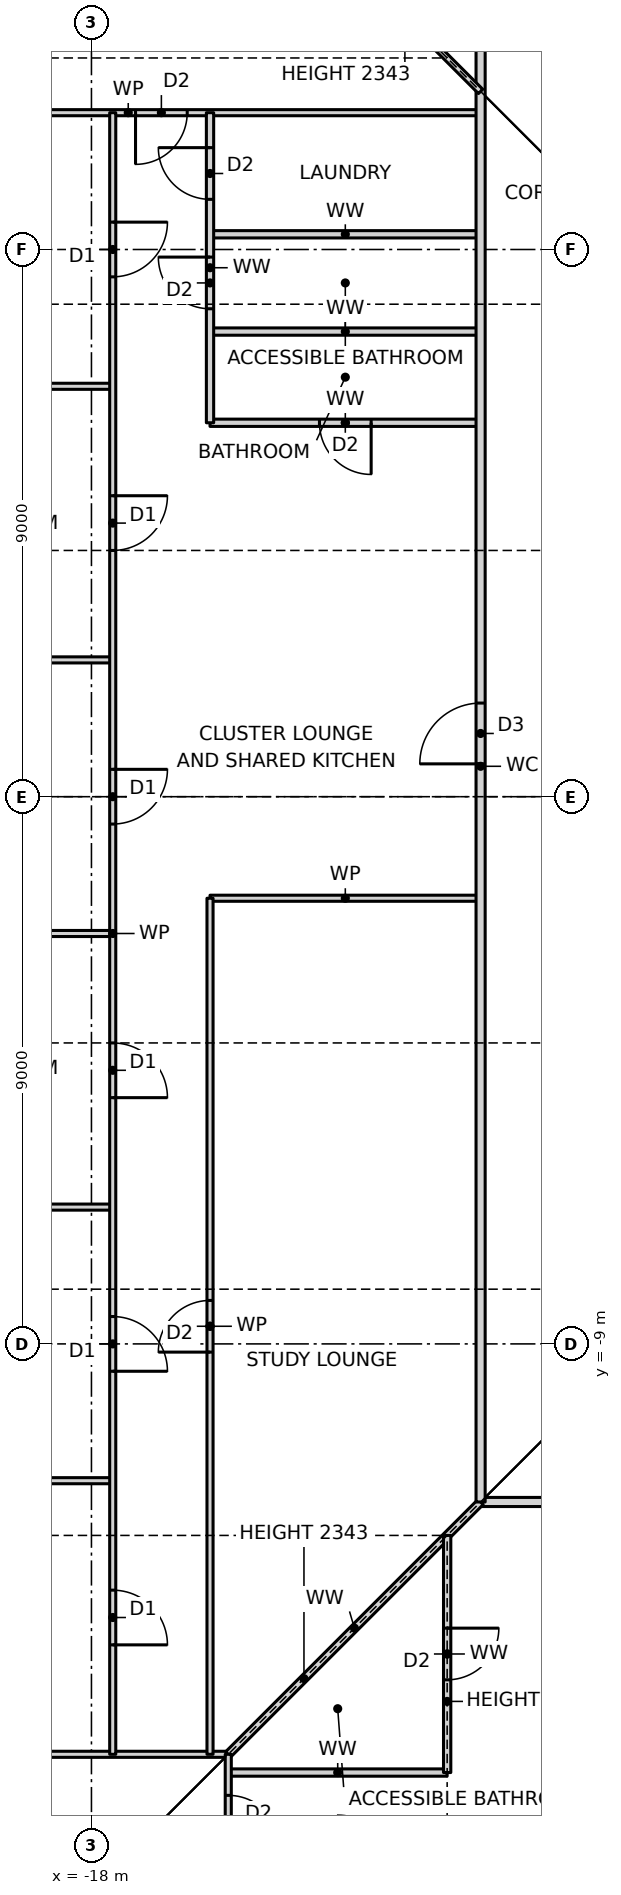
"""IFC4 building model, lengths in metres.
Left out: names, types, materials, properties, quantities, classifications, styles, units other than length and angle.
Written with IfcOpenShell. Run it as: python <this file> out.ifc"""

import sys

from ifc_helpers import new_model, si_unit, direction, frame, frame_2d, origin, place, context, subcontext, project, spatial, rectangle, extrude, element, fill, save


model = new_model("IFC4")
c1 = context("Model", 3, precision=1e-05, world=origin(), true_north=direction((0.0, 1.0)))
c2 = subcontext(c1, "Body", "Model", "MODEL_VIEW")
j1 = project(units=[si_unit("LENGTHUNIT", "METRE"), si_unit("PLANEANGLEUNIT", "RADIAN")], contexts=[c1])
p1 = place(None, origin())
s1 = spatial("IfcSite", under=j1, at=p1, CompositionType="ELEMENT")
p2 = place(p1, origin())
s2 = spatial("IfcBuilding", under=s1, at=p2, CompositionType="ELEMENT")
p3 = place(p2, frame((0.0, 0.0, 39.5)))
s3 = spatial("IfcBuildingStorey", under=s2, at=p3, CompositionType="ELEMENT", Elevation=39.5)
p4 = place(p3, frame((-15.75, -16.05, 0.0), z_axis=(0.0, 0.0, 1.0), x_axis=(1.0, 0.0, 0.0)))
e1 = element("IfcWall", 1, at=p4, inside=s3, PredefinedType="PARTITIONING", context=c2, shape_type="SweptSolid", body=[
    extrude(rectangle(XDim=3.6, YDim=0.12, at=frame_2d((1.8, 0.0))), origin(), (0.0, 0.0, 1.0), 3.27),
])
p5 = place(p3, frame((-23.19, -15.75, 0.0), z_axis=(0.0, 0.0, 1.0), x_axis=(1.0, 0.0, 0.0)))
e2 = element("IfcWall", 2, at=p5, inside=s3, PredefinedType="PARTITIONING", context=c2, shape_type="SweptSolid", body=[
    extrude(rectangle(XDim=7.44, YDim=0.1, at=frame_2d((3.72, 0.0))), origin(), (0.0, 0.0, 1.0), 3.27),
])
p6 = place(p3, frame((-11.6, -11.6, 0.0), z_axis=(0.0, 0.0, 1.0), x_axis=(1.0, 0.0, 0.0)))
e3 = element("IfcWall", 3, at=p6, inside=s3, PredefinedType="PARTITIONING", context=c2, shape_type="SweptSolid", body=[
    extrude(rectangle(XDim=23.2, YDim=0.15, at=frame_2d((11.6, 0.0))), origin(), (0.0, 0.0, 1.0), 3.27),
])
p7 = place(p6, frame((2.975, 0.0, 0.0)))
e4 = element("IfcOpeningElement", 4, at=p7, cuts=e3, PredefinedType="OPENING", context=c2, shape_type="SweptSolid", body=[
    extrude(rectangle(XDim=1.0, YDim=2.1, at=frame_2d((0.5, 1.05))), frame((0.0, 0.085, 0.0), z_axis=(0.0, -1.0, 0.0), x_axis=(1.0, 0.0, 0.0)), (0.0, 0.0, 1.0), 0.17),
])
p8 = place(p6, frame((18.6, 0.0, 0.0)))
e5 = element("IfcOpeningElement", 5, at=p8, cuts=e3, PredefinedType="OPENING", context=c2, shape_type="SweptSolid", body=[
    extrude(rectangle(XDim=1.0, YDim=2.1, at=frame_2d((0.5, 1.05))), frame((0.0, 0.085, 0.0), z_axis=(0.0, -1.0, 0.0), x_axis=(1.0, 0.0, 0.0)), (0.0, 0.0, 1.0), 0.17),
])
for number, where, z_axis, x_axis in (
    (6, (-23.19, -11.25, 0.0), (0.0, 0.0, 1.0), (1.0, 0.0, 0.0)),
    (7, (-23.19, -6.75, 0.0), (0.0, 0.0, 1.0), (1.0, 0.0, 0.0)),
    (8, (-23.19, -2.25, 0.0), (0.0, 0.0, 1.0), (1.0, 0.0, 0.0)),
):
    element("IfcWall", number, at=place(p3, frame(where, z_axis=z_axis, x_axis=x_axis)), inside=s3, PredefinedType="PARTITIONING", context=c2, shape_type="SweptSolid", body=[
        extrude(rectangle(XDim=5.54, YDim=0.1, at=frame_2d((2.77, 0.0))), origin(), (0.0, 0.0, 1.0), 3.27),
    ])
p9 = place(p3, frame((-16.05, -1.67, 0.0), z_axis=(0.0, 0.0, 1.0), x_axis=(1.0, 0.0, 0.0)))
e9 = element("IfcWall", 9, at=p9, inside=s3, PredefinedType="PARTITIONING", context=c2, shape_type="SweptSolid", body=[
    extrude(rectangle(XDim=4.45, YDim=0.1, at=frame_2d((2.225, 0.0))), origin(), (0.0, 0.0, 1.0), 3.27),
])
p10 = place(p3, frame((-23.19, 2.25, 0.0), z_axis=(0.0, 0.0, 1.0), x_axis=(1.0, 0.0, 0.0)))
e10 = element("IfcWall", 10, at=p10, inside=s3, PredefinedType="PARTITIONING", context=c2, shape_type="SweptSolid", body=[
    extrude(rectangle(XDim=5.54, YDim=0.1, at=frame_2d((2.77, 0.0))), origin(), (0.0, 0.0, 1.0), 3.27),
])
p11 = place(p3, frame((-16.05, 6.15, 0.0), z_axis=(0.0, 0.0, 1.0), x_axis=(1.0, 0.0, 0.0)))
e11 = element("IfcWall", 11, at=p11, inside=s3, PredefinedType="PARTITIONING", context=c2, shape_type="SweptSolid", body=[
    extrude(rectangle(XDim=4.45, YDim=0.12, at=frame_2d((2.225, 0.0))), origin(), (0.0, 0.0, 1.0), 3.27),
])
p12 = place(p11, frame((1.8, 0.0, 0.0)))
e12 = element("IfcOpeningElement", 12, at=p12, cuts=e11, PredefinedType="OPENING", context=c2, shape_type="SweptSolid", body=[
    extrude(rectangle(XDim=0.85, YDim=2.1, at=frame_2d((0.425, 1.05))), frame((0.0, 0.07, 0.0), z_axis=(0.0, -1.0, 0.0), x_axis=(1.0, 0.0, 0.0)), (0.0, 0.0, 1.0), 0.14),
])
p13 = place(p3, frame((-23.19, 6.75, 0.0), z_axis=(0.0, 0.0, 1.0), x_axis=(1.0, 0.0, 0.0)))
e13 = element("IfcWall", 13, at=p13, inside=s3, PredefinedType="PARTITIONING", context=c2, shape_type="SweptSolid", body=[
    extrude(rectangle(XDim=5.54, YDim=0.1, at=frame_2d((2.77, 0.0))), origin(), (0.0, 0.0, 1.0), 3.27),
])
for number, where, z_axis, x_axis in (
    (14, (-16.05, 7.65, 0.0), (0.0, 0.0, 1.0), (1.0, 0.0, 0.0)),
    (15, (-16.05, 9.25, 0.0), (0.0, 0.0, 1.0), (1.0, 0.0, 0.0)),
):
    element("IfcWall", number, at=place(p3, frame(where, z_axis=z_axis, x_axis=x_axis)), inside=s3, PredefinedType="PARTITIONING", context=c2, shape_type="SweptSolid", body=[
        extrude(rectangle(XDim=4.45, YDim=0.12, at=frame_2d((2.225, 0.0))), origin(), (0.0, 0.0, 1.0), 3.27),
    ])
p14 = place(p3, frame((-23.19, 11.25, 0.0), z_axis=(0.0, 0.0, 1.0), x_axis=(1.0, 0.0, 0.0)))
e16 = element("IfcWall", 16, at=p14, inside=s3, PredefinedType="PARTITIONING", context=c2, shape_type="SweptSolid", body=[
    extrude(rectangle(XDim=11.59, YDim=0.1, at=frame_2d((5.795, 0.0))), origin(), (0.0, 0.0, 1.0), 3.27),
])
p15 = place(p14, frame((5.915, 0.0, 0.0)))
e17 = element("IfcOpeningElement", 17, at=p15, cuts=e16, PredefinedType="OPENING", context=c2, shape_type="SweptSolid", body=[
    extrude(rectangle(XDim=0.85, YDim=2.1, at=frame_2d((0.425, 1.05))), frame((0.0, 0.06, 0.0), z_axis=(0.0, -1.0, 0.0), x_axis=(1.0, 0.0, 0.0)), (0.0, 0.0, 1.0), 0.12),
])
p16 = place(p3, frame((-15.75, -15.75, 0.0), z_axis=(0.0, 0.0, 1.0), x_axis=(0.707106781187, 0.707106781187, 0.0)))
e18 = element("IfcWall", 18, at=p16, inside=s3, PredefinedType="PARTITIONING", context=c2, shape_type="SweptSolid", body=[
    extrude(rectangle(XDim=5.869, YDim=0.12, at=frame_2d((2.935, 0.0))), origin(), (0.0, 0.0, 1.0), 2.343),
])
p17 = place(p3, frame((-11.6, -11.6, 0.0), z_axis=(0.0, 0.0, 1.0), x_axis=(0.0, 1.0, 0.0)))
e19 = element("IfcWall", 19, at=p17, inside=s3, PredefinedType="PARTITIONING", context=c2, shape_type="SweptSolid", body=[
    extrude(rectangle(XDim=24.2, YDim=0.15, at=frame_2d((12.1, 0.0))), origin(), (0.0, 0.0, 1.0), 3.27),
])
p18 = place(p17, frame((12.14, 0.0, 0.0)))
e20 = element("IfcOpeningElement", 20, at=p18, cuts=e19, PredefinedType="OPENING", context=c2, shape_type="SweptSolid", body=[
    extrude(rectangle(XDim=1.0, YDim=2.1, at=frame_2d((0.5, 1.05))), frame((0.0, 0.085, 0.0), z_axis=(0.0, -1.0, 0.0), x_axis=(1.0, 0.0, 0.0)), (0.0, 0.0, 1.0), 0.17),
])
p19 = place(p3, frame((-12.15, -16.05, 0.0), z_axis=(0.0, 0.0, 1.0), x_axis=(0.0, 1.0, 0.0)))
e21 = element("IfcWall", 21, at=p19, inside=s3, PredefinedType="PARTITIONING", context=c2, shape_type="SweptSolid", body=[
    extrude(rectangle(XDim=3.9, YDim=0.12, at=frame_2d((1.95, 0.0))), origin(), (0.0, 0.0, 1.0), 2.508),
])
p20 = place(p19, frame((1.525, 0.0, 0.0)))
e22 = element("IfcOpeningElement", 22, at=p20, cuts=e21, PredefinedType="OPENING", context=c2, shape_type="SweptSolid", body=[
    extrude(rectangle(XDim=0.85, YDim=2.1, at=frame_2d((0.425, 1.05))), frame((0.0, 0.07, 0.0), z_axis=(0.0, -1.0, 0.0), x_axis=(1.0, 0.0, 0.0)), (0.0, 0.0, 1.0), 0.14),
])
p21 = place(p3, frame((-15.75, -23.19, 0.0), z_axis=(0.0, 0.0, 1.0), x_axis=(0.0, 1.0, 0.0)))
e23 = element("IfcWall", 23, at=p21, inside=s3, PredefinedType="PARTITIONING", context=c2, shape_type="SweptSolid", body=[
    extrude(rectangle(XDim=7.44, YDim=0.1, at=frame_2d((3.72, 0.0))), origin(), (0.0, 0.0, 1.0), 3.27),
])
p22 = place(p21, frame((5.915, 0.0, 0.0)))
e24 = element("IfcOpeningElement", 24, at=p22, cuts=e23, PredefinedType="OPENING", context=c2, shape_type="SweptSolid", body=[
    extrude(rectangle(XDim=0.85, YDim=2.1, at=frame_2d((0.425, 1.05))), frame((0.0, 0.06, 0.0), z_axis=(0.0, -1.0, 0.0), x_axis=(1.0, 0.0, 0.0)), (0.0, 0.0, 1.0), 0.12),
])
p23 = place(p3, frame((-16.05, -15.75, 0.0), z_axis=(0.0, 0.0, 1.0), x_axis=(0.0, 1.0, 0.0)))
e25 = element("IfcWall", 25, at=p23, inside=s3, PredefinedType="PARTITIONING", context=c2, shape_type="SweptSolid", body=[
    extrude(rectangle(XDim=14.08, YDim=0.1, at=frame_2d((7.04, 0.0))), origin(), (0.0, 0.0, 1.0), 3.27),
])
p24 = place(p23, frame((6.615, 0.0, 0.0)))
e26 = element("IfcOpeningElement", 26, at=p24, cuts=e25, PredefinedType="OPENING", context=c2, shape_type="SweptSolid", body=[
    extrude(rectangle(XDim=0.85, YDim=2.1, at=frame_2d((0.425, 1.05))), frame((0.0, 0.06, 0.0), z_axis=(0.0, -1.0, 0.0), x_axis=(1.0, 0.0, 0.0)), (0.0, 0.0, 1.0), 0.12),
])
p25 = place(p3, frame((-16.05, 6.15, 0.0), z_axis=(0.0, 0.0, 1.0), x_axis=(0.0, 1.0, 0.0)))
e27 = element("IfcWall", 27, at=p25, inside=s3, PredefinedType="PARTITIONING", context=c2, shape_type="SweptSolid", body=[
    extrude(rectangle(XDim=5.1, YDim=0.12, at=frame_2d((2.55, 0.0))), origin(), (0.0, 0.0, 1.0), 3.27),
])
p26 = place(p25, frame((3.675, 0.0, 0.0)))
e28 = element("IfcOpeningElement", 28, at=p26, cuts=e27, PredefinedType="OPENING", context=c2, shape_type="SweptSolid", body=[
    extrude(rectangle(XDim=0.85, YDim=2.1, at=frame_2d((0.425, 1.05))), frame((0.0, 0.07, 0.0), z_axis=(0.0, -1.0, 0.0), x_axis=(1.0, 0.0, 0.0)), (0.0, 0.0, 1.0), 0.14),
])
p27 = place(p25, frame((1.875, 0.0, 0.0)))
e29 = element("IfcOpeningElement", 29, at=p27, cuts=e27, PredefinedType="OPENING", context=c2, shape_type="SweptSolid", body=[
    extrude(rectangle(XDim=0.85, YDim=2.1, at=frame_2d((0.425, 1.05))), frame((0.0, 0.07, 0.0), z_axis=(0.0, -1.0, 0.0), x_axis=(1.0, 0.0, 0.0)), (0.0, 0.0, 1.0), 0.14),
])
p28 = place(p3, frame((-17.65, -15.75, 0.0), z_axis=(0.0, 0.0, 1.0), x_axis=(0.0, 1.0, 0.0)))
e30 = element("IfcWall", 30, at=p28, inside=s3, PredefinedType="PARTITIONING", context=c2, shape_type="SweptSolid", body=[
    extrude(rectangle(XDim=27.0, YDim=0.1, at=frame_2d((13.5, 0.0))), origin(), (0.0, 0.0, 1.0), 3.27),
])
p29 = place(p28, frame((24.3, 0.0, 0.0)))
e31 = element("IfcOpeningElement", 31, at=p29, cuts=e30, PredefinedType="OPENING", context=c2, shape_type="SweptSolid", body=[
    extrude(rectangle(XDim=0.9, YDim=2.1, at=frame_2d((0.45, 1.05))), frame((0.0, 0.06, 0.0), z_axis=(0.0, -1.0, 0.0), x_axis=(1.0, 0.0, 0.0)), (0.0, 0.0, 1.0), 0.12),
])
p30 = place(p28, frame((19.8, 0.0, 0.0)))
e32 = element("IfcOpeningElement", 32, at=p30, cuts=e30, PredefinedType="OPENING", context=c2, shape_type="SweptSolid", body=[
    extrude(rectangle(XDim=0.9, YDim=2.1, at=frame_2d((0.45, 1.05))), frame((0.0, 0.06, 0.0), z_axis=(0.0, -1.0, 0.0), x_axis=(1.0, 0.0, 0.0)), (0.0, 0.0, 1.0), 0.12),
])
p31 = place(p28, frame((15.3, 0.0, 0.0)))
e33 = element("IfcOpeningElement", 33, at=p31, cuts=e30, PredefinedType="OPENING", context=c2, shape_type="SweptSolid", body=[
    extrude(rectangle(XDim=0.9, YDim=2.1, at=frame_2d((0.45, 1.05))), frame((0.0, 0.06, 0.0), z_axis=(0.0, -1.0, 0.0), x_axis=(1.0, 0.0, 0.0)), (0.0, 0.0, 1.0), 0.12),
])
p32 = place(p28, frame((10.8, 0.0, 0.0)))
e34 = element("IfcOpeningElement", 34, at=p32, cuts=e30, PredefinedType="OPENING", context=c2, shape_type="SweptSolid", body=[
    extrude(rectangle(XDim=0.9, YDim=2.1, at=frame_2d((0.45, 1.05))), frame((0.0, 0.06, 0.0), z_axis=(0.0, -1.0, 0.0), x_axis=(1.0, 0.0, 0.0)), (0.0, 0.0, 1.0), 0.12),
])
p33 = place(p28, frame((6.3, 0.0, 0.0)))
e35 = element("IfcOpeningElement", 35, at=p33, cuts=e30, PredefinedType="OPENING", context=c2, shape_type="SweptSolid", body=[
    extrude(rectangle(XDim=0.9, YDim=2.1, at=frame_2d((0.45, 1.05))), frame((0.0, 0.06, 0.0), z_axis=(0.0, -1.0, 0.0), x_axis=(1.0, 0.0, 0.0)), (0.0, 0.0, 1.0), 0.12),
])
p34 = place(p28, frame((1.8, 0.0, 0.0)))
e36 = element("IfcOpeningElement", 36, at=p34, cuts=e30, PredefinedType="OPENING", context=c2, shape_type="SweptSolid", body=[
    extrude(rectangle(XDim=0.9, YDim=2.1, at=frame_2d((0.45, 1.05))), frame((0.0, 0.06, 0.0), z_axis=(0.0, -1.0, 0.0), x_axis=(1.0, 0.0, 0.0)), (0.0, 0.0, 1.0), 0.12),
])
p35 = place(p3, frame((-11.6, 11.6, 0.0), z_axis=(0.0, 0.0, 1.0), x_axis=(-0.707106781187, 0.707106781187, 0.0)))
e37 = element("IfcWall", 37, at=p35, inside=s3, PredefinedType="PARTITIONING", context=c2, shape_type="SweptSolid", body=[
    extrude(rectangle(XDim=5.869, YDim=0.1, at=frame_2d((2.935, 0.0))), origin(), (0.0, 0.0, 1.0), 2.343),
])
p36 = place(p20, frame((0.85, 0.0, 0.0), z_axis=(0.0, 0.0, 1.0), x_axis=(-1.0, 0.0, 0.0)))
e38 = element("IfcDoor", 38, at=p36, inside=s3, OperationType="SINGLE_SWING_LEFT", PredefinedType="DOOR", context=c2, shape_type="SweptSolid", body=[
    extrude(rectangle(XDim=0.85, YDim=2.1, at=frame_2d((0.425, 1.05))), frame((0.0, 0.025, 0.0), z_axis=(0.0, -1.0, 0.0), x_axis=(1.0, 0.0, 0.0)), (0.0, 0.0, 1.0), 0.05),
])
fill(e22, e38)
p37 = place(p15, frame((0.85, 0.0, 0.0), z_axis=(0.0, 0.0, 1.0), x_axis=(-1.0, 0.0, 0.0)))
e39 = element("IfcDoor", 39, at=p37, inside=s3, OperationType="SINGLE_SWING_RIGHT", PredefinedType="DOOR", context=c2, shape_type="SweptSolid", body=[
    extrude(rectangle(XDim=0.85, YDim=2.1, at=frame_2d((0.425, 1.05))), frame((0.0, 0.025, 0.0), z_axis=(0.0, -1.0, 0.0), x_axis=(1.0, 0.0, 0.0)), (0.0, 0.0, 1.0), 0.05),
])
fill(e17, e39)
p38 = place(p29, frame((0.9, 0.0, 0.0), z_axis=(0.0, 0.0, 1.0), x_axis=(-1.0, 0.0, 0.0)))
e40 = element("IfcDoor", 40, at=p38, inside=s3, OperationType="SINGLE_SWING_LEFT", PredefinedType="DOOR", context=c2, shape_type="SweptSolid", body=[
    extrude(rectangle(XDim=0.9, YDim=2.1, at=frame_2d((0.45, 1.05))), frame((0.0, 0.025, 0.0), z_axis=(0.0, -1.0, 0.0), x_axis=(1.0, 0.0, 0.0)), (0.0, 0.0, 1.0), 0.05),
])
fill(e31, e40)
p39 = place(p30, frame((0.9, 0.0, 0.0), z_axis=(0.0, 0.0, 1.0), x_axis=(-1.0, 0.0, 0.0)))
e41 = element("IfcDoor", 41, at=p39, inside=s3, OperationType="SINGLE_SWING_LEFT", PredefinedType="DOOR", context=c2, shape_type="SweptSolid", body=[
    extrude(rectangle(XDim=0.9, YDim=2.1, at=frame_2d((0.45, 1.05))), frame((0.0, 0.025, 0.0), z_axis=(0.0, -1.0, 0.0), x_axis=(1.0, 0.0, 0.0)), (0.0, 0.0, 1.0), 0.05),
])
fill(e32, e41)
p40 = place(p31, frame((0.9, 0.0, 0.0), z_axis=(0.0, 0.0, 1.0), x_axis=(-1.0, 0.0, 0.0)))
e42 = element("IfcDoor", 42, at=p40, inside=s3, OperationType="SINGLE_SWING_LEFT", PredefinedType="DOOR", context=c2, shape_type="SweptSolid", body=[
    extrude(rectangle(XDim=0.9, YDim=2.1, at=frame_2d((0.45, 1.05))), frame((0.0, 0.025, 0.0), z_axis=(0.0, -1.0, 0.0), x_axis=(1.0, 0.0, 0.0)), (0.0, 0.0, 1.0), 0.05),
])
fill(e33, e42)
p41 = place(p32, frame((0.9, 0.0, 0.0), z_axis=(0.0, 0.0, 1.0), x_axis=(-1.0, 0.0, 0.0)))
e43 = element("IfcDoor", 43, at=p41, inside=s3, OperationType="SINGLE_SWING_RIGHT", PredefinedType="DOOR", context=c2, shape_type="SweptSolid", body=[
    extrude(rectangle(XDim=0.9, YDim=2.1, at=frame_2d((0.45, 1.05))), frame((0.0, 0.025, 0.0), z_axis=(0.0, -1.0, 0.0), x_axis=(1.0, 0.0, 0.0)), (0.0, 0.0, 1.0), 0.05),
])
fill(e34, e43)
p42 = place(p33, frame((0.9, 0.0, 0.0), z_axis=(0.0, 0.0, 1.0), x_axis=(-1.0, 0.0, 0.0)))
e44 = element("IfcDoor", 44, at=p42, inside=s3, OperationType="SINGLE_SWING_RIGHT", PredefinedType="DOOR", context=c2, shape_type="SweptSolid", body=[
    extrude(rectangle(XDim=0.9, YDim=2.1, at=frame_2d((0.45, 1.05))), frame((0.0, 0.025, 0.0), z_axis=(0.0, -1.0, 0.0), x_axis=(1.0, 0.0, 0.0)), (0.0, 0.0, 1.0), 0.05),
])
fill(e35, e44)
p43 = place(p34, frame((0.9, 0.0, 0.0), z_axis=(0.0, 0.0, 1.0), x_axis=(-1.0, 0.0, 0.0)))
e45 = element("IfcDoor", 45, at=p43, inside=s3, OperationType="SINGLE_SWING_RIGHT", PredefinedType="DOOR", context=c2, shape_type="SweptSolid", body=[
    extrude(rectangle(XDim=0.9, YDim=2.1, at=frame_2d((0.45, 1.05))), frame((0.0, 0.025, 0.0), z_axis=(0.0, -1.0, 0.0), x_axis=(1.0, 0.0, 0.0)), (0.0, 0.0, 1.0), 0.05),
])
fill(e36, e45)
p44 = place(p18, origin())
e46 = element("IfcDoor", 46, at=p44, inside=s3, OperationType="SINGLE_SWING_LEFT", PredefinedType="DOOR", context=c2, shape_type="SweptSolid", body=[
    extrude(rectangle(XDim=1.0, YDim=2.1, at=frame_2d((0.5, 1.05))), frame((0.0, 0.025, 0.0), z_axis=(0.0, -1.0, 0.0), x_axis=(1.0, 0.0, 0.0)), (0.0, 0.0, 1.0), 0.05),
])
fill(e20, e46)
p45 = place(p26, origin())
e47 = element("IfcDoor", 47, at=p45, inside=s3, OperationType="SINGLE_SWING_RIGHT", PredefinedType="DOOR", context=c2, shape_type="SweptSolid", body=[
    extrude(rectangle(XDim=0.85, YDim=2.1, at=frame_2d((0.425, 1.05))), frame((0.0, 0.025, 0.0), z_axis=(0.0, -1.0, 0.0), x_axis=(1.0, 0.0, 0.0)), (0.0, 0.0, 1.0), 0.05),
])
fill(e28, e47)
p46 = place(p27, origin())
e48 = element("IfcDoor", 48, at=p46, inside=s3, OperationType="SINGLE_SWING_RIGHT", PredefinedType="DOOR", context=c2, shape_type="SweptSolid", body=[
    extrude(rectangle(XDim=0.85, YDim=2.1, at=frame_2d((0.425, 1.05))), frame((0.0, 0.025, 0.0), z_axis=(0.0, -1.0, 0.0), x_axis=(1.0, 0.0, 0.0)), (0.0, 0.0, 1.0), 0.05),
])
fill(e29, e48)
p47 = place(p12, frame((0.85, 0.0, 0.0), z_axis=(0.0, 0.0, 1.0), x_axis=(-1.0, 0.0, 0.0)))
e49 = element("IfcDoor", 49, at=p47, inside=s3, OperationType="SINGLE_SWING_LEFT", PredefinedType="DOOR", context=c2, shape_type="SweptSolid", body=[
    extrude(rectangle(XDim=0.85, YDim=2.1, at=frame_2d((0.425, 1.05))), frame((0.0, 0.025, 0.0), z_axis=(0.0, -1.0, 0.0), x_axis=(1.0, 0.0, 0.0)), (0.0, 0.0, 1.0), 0.05),
])
fill(e12, e49)
p48 = place(p24, origin())
e50 = element("IfcDoor", 50, at=p48, inside=s3, OperationType="SINGLE_SWING_LEFT", PredefinedType="DOOR", context=c2, shape_type="SweptSolid", body=[
    extrude(rectangle(XDim=0.85, YDim=2.1, at=frame_2d((0.425, 1.05))), frame((0.0, 0.025, 0.0), z_axis=(0.0, -1.0, 0.0), x_axis=(1.0, 0.0, 0.0)), (0.0, 0.0, 1.0), 0.05),
])
fill(e26, e50)
p49 = place(p22, frame((0.85, 0.0, 0.0), z_axis=(0.0, 0.0, 1.0), x_axis=(-1.0, 0.0, 0.0)))
e51 = element("IfcDoor", 51, at=p49, inside=s3, OperationType="SINGLE_SWING_RIGHT", PredefinedType="DOOR", context=c2, shape_type="SweptSolid", body=[
    extrude(rectangle(XDim=0.85, YDim=2.1, at=frame_2d((0.425, 1.05))), frame((0.0, 0.025, 0.0), z_axis=(0.0, -1.0, 0.0), x_axis=(1.0, 0.0, 0.0)), (0.0, 0.0, 1.0), 0.05),
])
fill(e24, e51)
save(model, sys.argv[1])
